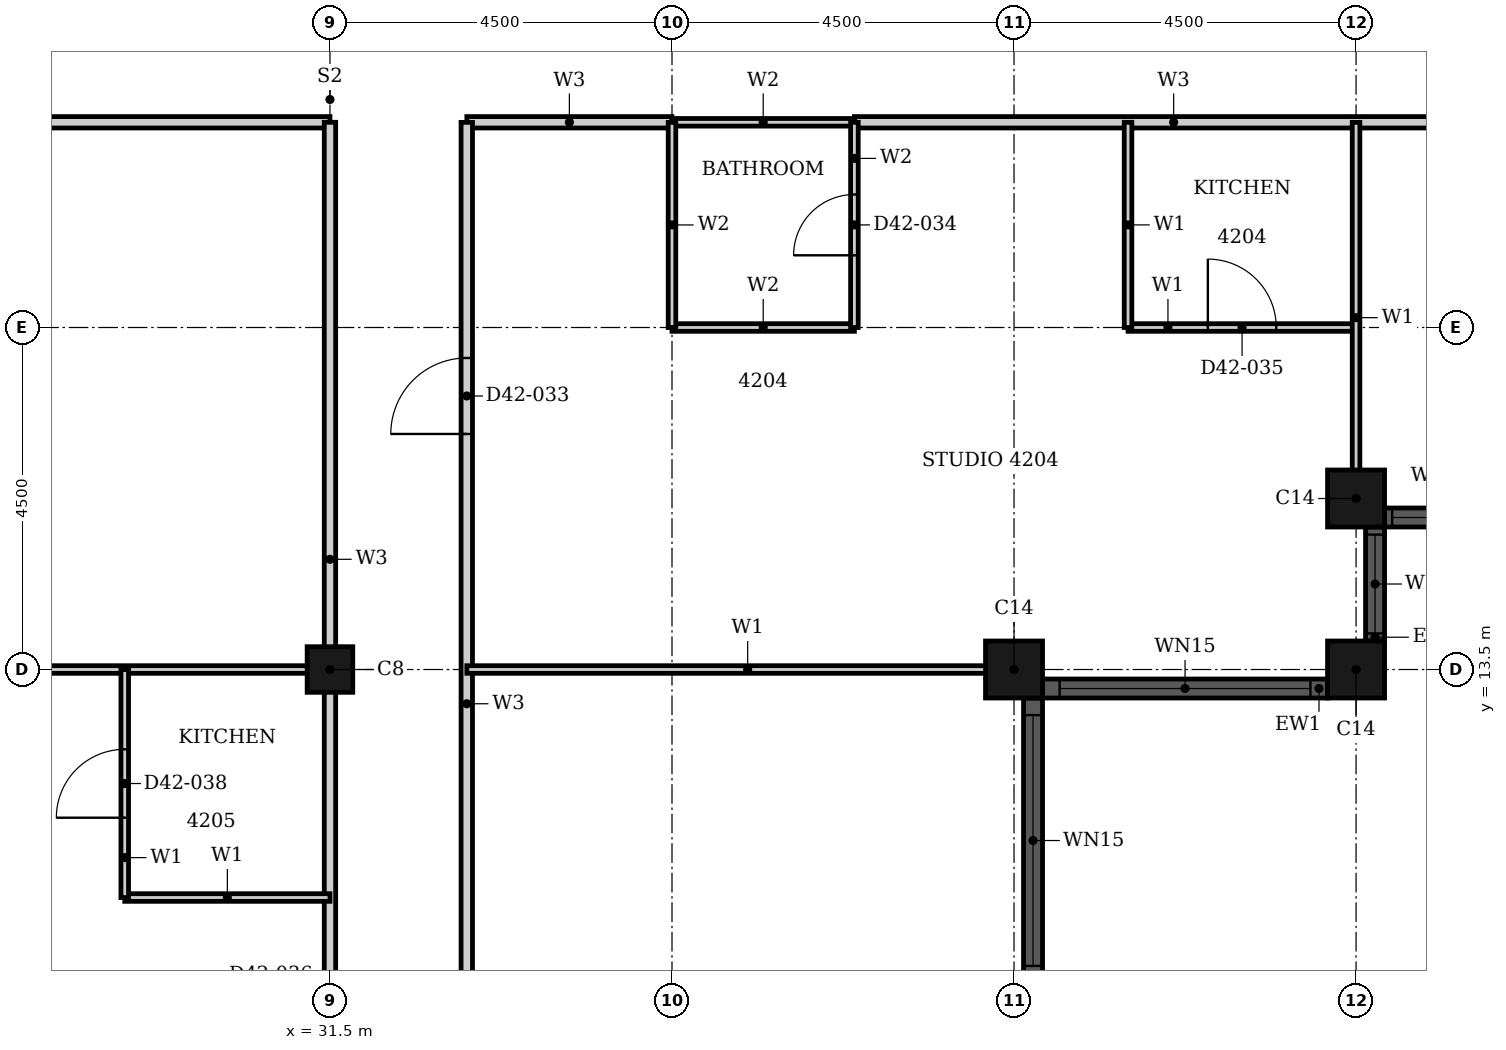
"""IFC4 building model, lengths in metres.
Left out: names, types, materials, properties, quantities, classifications, styles, units other than length and angle.
Written with IfcOpenShell. Run it as: python <this file> out.ifc"""

import sys

from ifc_helpers import new_model, si_unit, direction, frame, frame_2d, origin, origin_2d, place, context, subcontext, project, spatial, rectangle, hollow_rectangle, extrude, element, fill, save


model = new_model("IFC4")
c1 = context("Model", 3, precision=1e-05, world=origin(), true_north=direction((0.0, 1.0)))
c2 = subcontext(c1, "Body", "Model", "MODEL_VIEW")
j1 = project(units=[si_unit("LENGTHUNIT", "METRE"), si_unit("PLANEANGLEUNIT", "RADIAN")], contexts=[c1])
p1 = place(None, origin())
s1 = spatial("IfcSite", under=j1, at=p1, CompositionType="ELEMENT")
p2 = place(p1, origin())
s2 = spatial("IfcBuilding", under=s1, at=p2, CompositionType="ELEMENT")
p3 = place(p2, frame((0.0, 0.0, 169.1)))
s3 = spatial("IfcBuildingStorey", under=s2, at=p3, CompositionType="ELEMENT", Elevation=169.1)
for number, where, z_axis, x_axis in (
    (1, (40.5, 13.5, 0.0), (0.0, 0.0, 1.0), (1.0, 0.0, 0.0)),
    (2, (45.0, 13.5, 0.0), (0.0, 0.0, 1.0), (1.0, 0.0, 0.0)),
    (3, (45.0, 15.75, 0.0), (0.0, 0.0, 1.0), (1.0, 0.0, 0.0)),
):
    element("IfcColumn", number, at=place(p3, frame(where, z_axis=z_axis, x_axis=x_axis)), inside=s3, PredefinedType="COLUMN", context=c2, shape_type="SweptSolid", body=[
        extrude(hollow_rectangle(XDim=0.75, YDim=0.75, WallThickness=0.024, at=origin_2d()), origin(), (0.0, 0.0, 1.0), 3.7),
    ])
p4 = place(p3, frame((31.5, 13.5, 0.0), z_axis=(0.0, 0.0, 1.0), x_axis=(1.0, 0.0, 0.0)))
e4 = element("IfcColumn", 4, at=p4, inside=s3, PredefinedType="COLUMN", context=c2, shape_type="SweptSolid", body=[
    extrude(hollow_rectangle(XDim=0.6, YDim=0.6, WallThickness=0.02, at=origin_2d()), origin(), (0.0, 0.0, 1.0), 3.7),
])
p5 = place(p3, frame((40.75, 4.875, 0.0), z_axis=(0.0, 0.0, 1.0), x_axis=(0.0, 1.0, 0.0)))
e5 = element("IfcWall", 5, at=p5, inside=s3, PredefinedType="SOLIDWALL", context=c2, shape_type="SweptSolid", body=[
    extrude(rectangle(XDim=8.25, YDim=0.25, at=frame_2d((4.125, 0.0))), origin(), (0.0, 0.0, 1.0), 3.7),
])
p6 = place(p5, frame((0.225, 0.0, 0.45)))
e6 = element("IfcOpeningElement", 6, at=p6, cuts=e5, PredefinedType="OPENING", context=c2, shape_type="SweptSolid", body=[
    extrude(rectangle(XDim=3.3, YDim=2.3, at=frame_2d((1.65, 1.15))), frame((0.0, 0.135, 0.0), z_axis=(0.0, -1.0, 0.0), x_axis=(1.0, 0.0, 0.0)), (0.0, 0.0, 1.0), 0.27),
])
p7 = place(p5, frame((4.725, 0.0, 0.45)))
e7 = element("IfcOpeningElement", 7, at=p7, cuts=e5, PredefinedType="OPENING", context=c2, shape_type="SweptSolid", body=[
    extrude(rectangle(XDim=3.3, YDim=2.3, at=frame_2d((1.65, 1.15))), frame((0.0, 0.135, 0.0), z_axis=(0.0, -1.0, 0.0), x_axis=(1.0, 0.0, 0.0)), (0.0, 0.0, 1.0), 0.27),
])
p8 = place(p3, frame((40.875, 13.25, 0.0), z_axis=(0.0, 0.0, 1.0), x_axis=(1.0, 0.0, 0.0)))
e8 = element("IfcWall", 8, at=p8, inside=s3, PredefinedType="SOLIDWALL", context=c2, shape_type="SweptSolid", body=[
    extrude(rectangle(XDim=3.75, YDim=0.25, at=frame_2d((1.875, 0.0))), origin(), (0.0, 0.0, 1.0), 3.7),
])
p9 = place(p8, frame((0.225, 0.0, 0.45)))
e9 = element("IfcOpeningElement", 9, at=p9, cuts=e8, PredefinedType="OPENING", context=c2, shape_type="SweptSolid", body=[
    extrude(rectangle(XDim=3.3, YDim=2.3, at=frame_2d((1.65, 1.15))), frame((0.0, 0.135, 0.0), z_axis=(0.0, -1.0, 0.0), x_axis=(1.0, 0.0, 0.0)), (0.0, 0.0, 1.0), 0.27),
])
p10 = place(p3, frame((45.25, 13.875, 0.0), z_axis=(0.0, 0.0, 1.0), x_axis=(0.0, 1.0, 0.0)))
e10 = element("IfcWall", 10, at=p10, inside=s3, PredefinedType="SOLIDWALL", context=c2, shape_type="SweptSolid", body=[
    extrude(rectangle(XDim=1.5, YDim=0.25, at=frame_2d((0.75, 0.0))), origin(), (0.0, 0.0, 1.0), 3.7),
])
p11 = place(p10, frame((0.1, 0.0, 0.9)))
e11 = element("IfcOpeningElement", 11, at=p11, cuts=e10, PredefinedType="OPENING", context=c2, shape_type="SweptSolid", body=[
    extrude(rectangle(XDim=1.3, YDim=1.85, at=frame_2d((0.65, 0.925))), frame((0.0, 0.135, 0.0), z_axis=(0.0, -1.0, 0.0), x_axis=(1.0, 0.0, 0.0)), (0.0, 0.0, 1.0), 0.27),
])
p12 = place(p3, frame((45.375, 15.5, 0.0), z_axis=(0.0, 0.0, 1.0), x_axis=(1.0, 0.0, 0.0)))
e12 = element("IfcWall", 12, at=p12, inside=s3, PredefinedType="SOLIDWALL", context=c2, shape_type="SweptSolid", body=[
    extrude(rectangle(XDim=1.5, YDim=0.25, at=frame_2d((0.75, 0.0))), origin(), (0.0, 0.0, 1.0), 3.7),
])
p13 = place(p12, frame((0.1, 0.0, 0.9)))
e13 = element("IfcOpeningElement", 13, at=p13, cuts=e12, PredefinedType="OPENING", context=c2, shape_type="SweptSolid", body=[
    extrude(rectangle(XDim=1.3, YDim=1.85, at=frame_2d((0.65, 0.925))), frame((0.0, 0.135, 0.0), z_axis=(0.0, -1.0, 0.0), x_axis=(1.0, 0.0, 0.0)), (0.0, 0.0, 1.0), 0.27),
])
p14 = place(p3, frame((33.301, 20.7, 0.0), z_axis=(0.0, 0.0, 1.0), x_axis=(1.0, 0.0, 0.0)))
e14 = element("IfcWall", 14, at=p14, inside=s3, PredefinedType="PARTITIONING", context=c2, shape_type="SweptSolid", body=[
    extrude(rectangle(XDim=2.698, YDim=0.15, at=frame_2d((1.349, 0.0))), origin(), (0.0, 0.0, 1.0), 3.4),
])
p15 = place(p3, frame((38.4, 20.7, 0.0), z_axis=(0.0, 0.0, 1.0), x_axis=(1.0, 0.0, 0.0)))
e15 = element("IfcWall", 15, at=p15, inside=s3, PredefinedType="PARTITIONING", context=c2, shape_type="SweptSolid", body=[
    extrude(rectangle(XDim=8.4, YDim=0.15, at=frame_2d((4.2, 0.0))), origin(), (0.0, 0.0, 1.0), 3.4),
])
p16 = place(p3, frame((18.0, 20.7, 0.0), z_axis=(0.0, 0.0, 1.0), x_axis=(1.0, 0.0, 0.0)))
e16 = element("IfcWall", 16, at=p16, inside=s3, PredefinedType="PARTITIONING", context=c2, shape_type="SweptSolid", body=[
    extrude(rectangle(XDim=13.5, YDim=0.15, at=frame_2d((6.75, 0.0))), origin(), (0.0, 0.0, 1.0), 3.4),
])
p17 = place(p16, frame((6.25, 0.0, 0.0)))
e17 = element("IfcOpeningElement", 17, at=p17, cuts=e16, PredefinedType="OPENING", context=c2, shape_type="SweptSolid", body=[
    extrude(rectangle(XDim=1.0, YDim=2.1, at=frame_2d((0.5, 1.05))), frame((0.0, 0.085, 0.0), z_axis=(0.0, -1.0, 0.0), x_axis=(1.0, 0.0, 0.0)), (0.0, 0.0, 1.0), 0.17),
])
p18 = place(p3, frame((31.5, 6.9, 0.0), z_axis=(0.0, 0.0, 1.0), x_axis=(0.0, 1.0, 0.0)))
e18 = element("IfcWall", 18, at=p18, inside=s3, PredefinedType="PARTITIONING", context=c2, shape_type="SweptSolid", body=[
    extrude(rectangle(XDim=13.8, YDim=0.15, at=frame_2d((6.9, 0.0))), origin(), (0.0, 0.0, 1.0), 2.68),
])
p19 = place(p18, frame((1.3, 0.0, 0.0)))
e19 = element("IfcOpeningElement", 19, at=p19, cuts=e18, PredefinedType="OPENING", context=c2, shape_type="SweptSolid", body=[
    extrude(rectangle(XDim=1.0, YDim=2.2, at=frame_2d((0.5, 1.1))), frame((0.0, 0.085, 0.0), z_axis=(0.0, -1.0, 0.0), x_axis=(1.0, 0.0, 0.0)), (0.0, 0.0, 1.0), 0.17),
])
p20 = place(p3, frame((33.3, 4.5, 0.0), z_axis=(0.0, 0.0, 1.0), x_axis=(0.0, 1.0, 0.0)))
e20 = element("IfcWall", 20, at=p20, inside=s3, PredefinedType="PARTITIONING", context=c2, shape_type="SweptSolid", body=[
    extrude(rectangle(XDim=16.199, YDim=0.15, at=frame_2d((8.1, 0.0))), origin(), (0.0, 0.0, 1.0), 3.4),
])
p21 = place(p20, frame((12.099, 0.0, 0.0)))
e21 = element("IfcOpeningElement", 21, at=p21, cuts=e20, PredefinedType="OPENING", context=c2, shape_type="SweptSolid", body=[
    extrude(rectangle(XDim=1.0, YDim=2.2, at=frame_2d((0.5, 1.1))), frame((0.0, 0.085, 0.0), z_axis=(0.0, -1.0, 0.0), x_axis=(1.0, 0.0, 0.0)), (0.0, 0.0, 1.0), 0.17),
])
p22 = place(p20, frame((4.0, 0.0, 0.0)))
e22 = element("IfcOpeningElement", 22, at=p22, cuts=e20, PredefinedType="OPENING", context=c2, shape_type="SweptSolid", body=[
    extrude(rectangle(XDim=1.0, YDim=2.1, at=frame_2d((0.5, 1.05))), frame((0.0, 0.085, 0.0), z_axis=(0.0, -1.0, 0.0), x_axis=(1.0, 0.0, 0.0)), (0.0, 0.0, 1.0), 0.17),
])
p23 = place(p3, frame((28.8, 10.5, 0.0), z_axis=(0.0, 0.0, 1.0), x_axis=(1.0, 0.0, 0.0)))
e23 = element("IfcWall", 23, at=p23, inside=s3, PredefinedType="PARTITIONING", context=c2, shape_type="SweptSolid", body=[
    extrude(rectangle(XDim=2.7, YDim=0.1, at=frame_2d((1.35, 0.0))), origin(), (0.0, 0.0, 1.0), 3.4),
])
p24 = place(p3, frame((33.301, 13.5, 0.0), z_axis=(0.0, 0.0, 1.0), x_axis=(1.0, 0.0, 0.0)))
e24 = element("IfcWall", 24, at=p24, inside=s3, PredefinedType="PARTITIONING", context=c2, shape_type="SweptSolid", body=[
    extrude(rectangle(XDim=7.389, YDim=0.1, at=frame_2d((3.694, 0.0))), origin(), (0.0, 0.0, 1.0), 2.48),
])
p25 = place(p3, frame((22.31, 13.5, 0.0), z_axis=(0.0, 0.0, 1.0), x_axis=(1.0, 0.0, 0.0)))
e25 = element("IfcWall", 25, at=p25, inside=s3, PredefinedType="PARTITIONING", context=c2, shape_type="SweptSolid", body=[
    extrude(rectangle(XDim=9.19, YDim=0.1, at=frame_2d((4.595, 0.0))), origin(), (0.0, 0.0, 1.0), 2.48),
])
p26 = place(p3, frame((42.0, 18.0, 0.0), z_axis=(0.0, 0.0, 1.0), x_axis=(1.0, 0.0, 0.0)))
e26 = element("IfcWall", 26, at=p26, inside=s3, PredefinedType="PARTITIONING", context=c2, shape_type="SweptSolid", body=[
    extrude(rectangle(XDim=3.0, YDim=0.1, at=frame_2d((1.5, 0.0))), origin(), (0.0, 0.0, 1.0), 3.4),
])
p27 = place(p26, frame((1.05, 0.0, 0.0)))
e27 = element("IfcOpeningElement", 27, at=p27, cuts=e26, PredefinedType="OPENING", context=c2, shape_type="SweptSolid", body=[
    extrude(rectangle(XDim=0.9, YDim=2.1, at=frame_2d((0.45, 1.05))), frame((0.0, 0.06, 0.0), z_axis=(0.0, -1.0, 0.0), x_axis=(1.0, 0.0, 0.0)), (0.0, 0.0, 1.0), 0.12),
])
p28 = place(p3, frame((28.8, 10.5, 0.0), z_axis=(0.0, 0.0, 1.0), x_axis=(0.0, 1.0, 0.0)))
e28 = element("IfcWall", 28, at=p28, inside=s3, PredefinedType="PARTITIONING", context=c2, shape_type="SweptSolid", body=[
    extrude(rectangle(XDim=3.0, YDim=0.1, at=frame_2d((1.5, 0.0))), origin(), (0.0, 0.0, 1.0), 3.4),
])
p29 = place(p28, frame((1.05, 0.0, 0.0)))
e29 = element("IfcOpeningElement", 29, at=p29, cuts=e28, PredefinedType="OPENING", context=c2, shape_type="SweptSolid", body=[
    extrude(rectangle(XDim=0.9, YDim=2.1, at=frame_2d((0.45, 1.05))), frame((0.0, 0.06, 0.0), z_axis=(0.0, -1.0, 0.0), x_axis=(1.0, 0.0, 0.0)), (0.0, 0.0, 1.0), 0.12),
])
p30 = place(p3, frame((42.0, 18.0, 0.0), z_axis=(0.0, 0.0, 1.0), x_axis=(0.0, 1.0, 0.0)))
e30 = element("IfcWall", 30, at=p30, inside=s3, PredefinedType="PARTITIONING", context=c2, shape_type="SweptSolid", body=[
    extrude(rectangle(XDim=2.7, YDim=0.1, at=frame_2d((1.35, 0.0))), origin(), (0.0, 0.0, 1.0), 3.4),
])
p31 = place(p3, frame((45.0, 15.56, 0.0), z_axis=(0.0, 0.0, 1.0), x_axis=(0.0, 1.0, 0.0)))
e31 = element("IfcWall", 31, at=p31, inside=s3, PredefinedType="PARTITIONING", context=c2, shape_type="SweptSolid", body=[
    extrude(rectangle(XDim=5.139, YDim=0.1, at=frame_2d((2.569, 0.0))), origin(), (0.0, 0.0, 1.0), 3.4),
])
for number, where, z_axis, x_axis in (
    (32, (36.0, 18.0, 0.0), (0.0, 0.0, 1.0), (1.0, 0.0, 0.0)),
    (33, (36.0, 20.7, 0.0), (0.0, 0.0, 1.0), (1.0, 0.0, 0.0)),
):
    element("IfcWall", number, at=place(p3, frame(where, z_axis=z_axis, x_axis=x_axis)), inside=s3, PredefinedType="PARTITIONING", context=c2, shape_type="SweptSolid", body=[
        extrude(rectangle(XDim=2.4, YDim=0.1, at=frame_2d((1.2, 0.0))), origin(), (0.0, 0.0, 1.0), 3.4),
    ])
p32 = place(p3, frame((36.0, 18.0, 0.0), z_axis=(0.0, 0.0, 1.0), x_axis=(0.0, 1.0, 0.0)))
e34 = element("IfcWall", 34, at=p32, inside=s3, PredefinedType="PARTITIONING", context=c2, shape_type="SweptSolid", body=[
    extrude(rectangle(XDim=2.699, YDim=0.1, at=frame_2d((1.35, 0.0))), origin(), (0.0, 0.0, 1.0), 3.4),
])
p33 = place(p3, frame((38.4, 18.0, 0.0), z_axis=(0.0, 0.0, 1.0), x_axis=(0.0, 1.0, 0.0)))
e35 = element("IfcWall", 35, at=p33, inside=s3, PredefinedType="PARTITIONING", context=c2, shape_type="SweptSolid", body=[
    extrude(rectangle(XDim=2.7, YDim=0.1, at=frame_2d((1.35, 0.0))), origin(), (0.0, 0.0, 1.0), 3.4),
])
p34 = place(p33, frame((0.95, 0.0, 0.0)))
e36 = element("IfcOpeningElement", 36, at=p34, cuts=e35, PredefinedType="OPENING", context=c2, shape_type="SweptSolid", body=[
    extrude(rectangle(XDim=0.8, YDim=2.1, at=frame_2d((0.4, 1.05))), frame((0.0, 0.06, 0.0), z_axis=(0.0, -1.0, 0.0), x_axis=(1.0, 0.0, 0.0)), (0.0, 0.0, 1.0), 0.12),
])
p35 = place(p7, origin())
e37 = element("IfcWindow", 37, at=p35, inside=s3, PartitioningType="SINGLE_PANEL", PredefinedType="WINDOW", context=c2, shape_type="SweptSolid", body=[
    extrude(rectangle(XDim=3.3, YDim=2.3, at=frame_2d((1.65, 1.15))), frame((0.0, 0.03, 0.0), z_axis=(0.0, -1.0, 0.0), x_axis=(1.0, 0.0, 0.0)), (0.0, 0.0, 1.0), 0.06),
])
fill(e7, e37)
p36 = place(p9, origin())
e38 = element("IfcWindow", 38, at=p36, inside=s3, PartitioningType="SINGLE_PANEL", PredefinedType="WINDOW", context=c2, shape_type="SweptSolid", body=[
    extrude(rectangle(XDim=3.3, YDim=2.3, at=frame_2d((1.65, 1.15))), frame((0.0, 0.03, 0.0), z_axis=(0.0, -1.0, 0.0), x_axis=(1.0, 0.0, 0.0)), (0.0, 0.0, 1.0), 0.06),
])
fill(e9, e38)
p37 = place(p11, origin())
e39 = element("IfcWindow", 39, at=p37, inside=s3, PartitioningType="SINGLE_PANEL", PredefinedType="WINDOW", context=c2, shape_type="SweptSolid", body=[
    extrude(rectangle(XDim=1.3, YDim=1.85, at=frame_2d((0.65, 0.925))), frame((0.0, 0.03, 0.0), z_axis=(0.0, -1.0, 0.0), x_axis=(1.0, 0.0, 0.0)), (0.0, 0.0, 1.0), 0.06),
])
fill(e11, e39)
p38 = place(p13, origin())
e40 = element("IfcWindow", 40, at=p38, inside=s3, PartitioningType="SINGLE_PANEL", PredefinedType="WINDOW", context=c2, shape_type="SweptSolid", body=[
    extrude(rectangle(XDim=1.3, YDim=1.85, at=frame_2d((0.65, 0.925))), frame((0.0, 0.03, 0.0), z_axis=(0.0, -1.0, 0.0), x_axis=(1.0, 0.0, 0.0)), (0.0, 0.0, 1.0), 0.06),
])
fill(e13, e40)
p39 = place(p21, origin())
e41 = element("IfcDoor", 41, at=p39, inside=s3, OperationType="SINGLE_SWING_LEFT", PredefinedType="DOOR", context=c2, shape_type="SweptSolid", body=[
    extrude(rectangle(XDim=1.0, YDim=2.2, at=frame_2d((0.5, 1.1))), frame((0.0, 0.025, 0.0), z_axis=(0.0, -1.0, 0.0), x_axis=(1.0, 0.0, 0.0)), (0.0, 0.0, 1.0), 0.05),
])
fill(e21, e41)
p40 = place(p34, origin())
e42 = element("IfcDoor", 42, at=p40, inside=s3, OperationType="SINGLE_SWING_RIGHT", PredefinedType="DOOR", context=c2, shape_type="SweptSolid", body=[
    extrude(rectangle(XDim=0.8, YDim=2.1, at=frame_2d((0.4, 1.05))), frame((0.0, 0.025, 0.0), z_axis=(0.0, -1.0, 0.0), x_axis=(1.0, 0.0, 0.0)), (0.0, 0.0, 1.0), 0.05),
])
fill(e36, e42)
p41 = place(p27, origin())
e43 = element("IfcDoor", 43, at=p41, inside=s3, OperationType="SINGLE_SWING_RIGHT", PredefinedType="DOOR", context=c2, shape_type="SweptSolid", body=[
    extrude(rectangle(XDim=0.9, YDim=2.1, at=frame_2d((0.45, 1.05))), frame((0.0, 0.025, 0.0), z_axis=(0.0, -1.0, 0.0), x_axis=(1.0, 0.0, 0.0)), (0.0, 0.0, 1.0), 0.05),
])
fill(e27, e43)
p42 = place(p29, origin())
e44 = element("IfcDoor", 44, at=p42, inside=s3, OperationType="SINGLE_SWING_LEFT", PredefinedType="DOOR", context=c2, shape_type="SweptSolid", body=[
    extrude(rectangle(XDim=0.9, YDim=2.1, at=frame_2d((0.45, 1.05))), frame((0.0, 0.025, 0.0), z_axis=(0.0, -1.0, 0.0), x_axis=(1.0, 0.0, 0.0)), (0.0, 0.0, 1.0), 0.05),
])
fill(e29, e44)
save(model, sys.argv[1])
